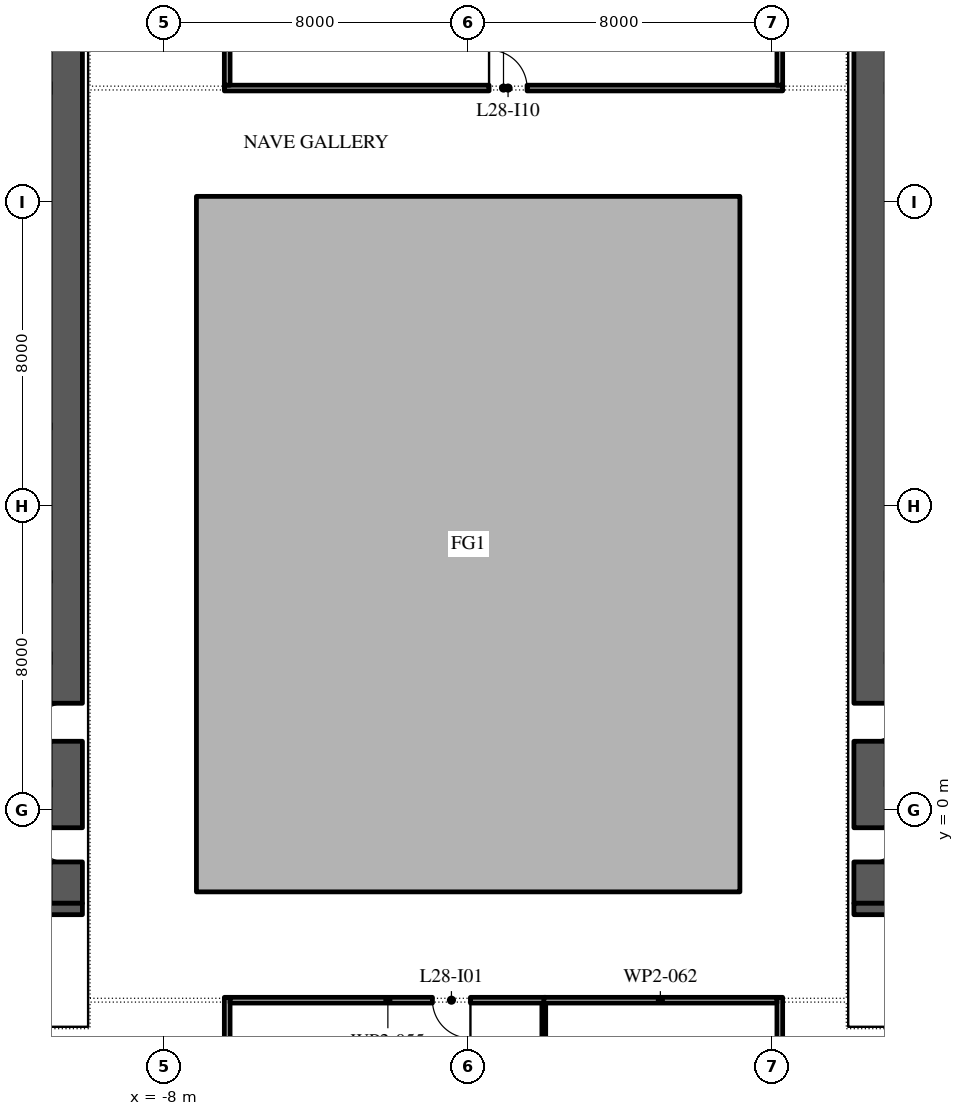
"""IFC4 building model, lengths in metres.
Left out: names, types, materials, properties, quantities, classifications, styles, units other than length and angle.
Written with IfcOpenShell. Run it as: python <this file> out.ifc"""

import sys

from ifc_helpers import new_model, si_unit, direction, frame, frame_2d, origin, place, context, subcontext, project, spatial, polyline, rectangle, outline, extrude, element, fill, save


model = new_model("IFC4")
c1 = context("Model", 3, precision=1e-05, world=origin(), true_north=direction((0.0, 1.0)))
c2 = subcontext(c1, "Body", "Model", "MODEL_VIEW")
j1 = project(units=[si_unit("LENGTHUNIT", "METRE"), si_unit("PLANEANGLEUNIT", "RADIAN")], contexts=[c1])
p1 = place(None, origin())
s1 = spatial("IfcSite", under=j1, at=p1, CompositionType="ELEMENT")
p2 = place(p1, origin())
s2 = spatial("IfcBuilding", under=s1, at=p2, CompositionType="ELEMENT")
p3 = place(p2, frame((0.0, 0.0, 130.8)))
s3 = spatial("IfcBuildingStorey", under=s2, at=p3, CompositionType="ELEMENT", Elevation=130.8)
p4 = place(p3, origin())
e1 = element("IfcWall", 1, at=p4, inside=s3, PredefinedType="STANDARD", context=c2, shape_type="SweptSolid", body=[
    extrude(outline(polyline([(-7.15, -2.15), (7.15, -2.15), (7.15, 16.15), (-7.15, 16.15), (-7.15, -2.15)]), holes=[polyline([(-7.0, -2.0), (-7.0, 16.0), (7.0, 16.0), (7.0, -2.0), (-7.0, -2.0)])]), origin(), (0.0, 0.0, 1.0), 4.0),
])
p5 = place(p3, frame((-10.575, -2.45, 0.0), z_axis=(0.0, 0.0, 1.0), x_axis=(0.0, 1.0, 0.0)))
e2 = element("IfcWall", 2, at=p5, inside=s3, PredefinedType="SHEAR", context=c2, shape_type="SweptSolid", body=[
    extrude(rectangle(XDim=27.9, YDim=0.85, at=frame_2d((13.95, 0.0))), origin(), (0.0, 0.0, 1.0), 4.0),
])
p6 = place(p5, frame((23.65, 0.0, 0.0)))
e3 = element("IfcOpeningElement", 3, at=p6, cuts=e2, PredefinedType="OPENING", context=c2, shape_type="SweptSolid", body=[
    extrude(rectangle(XDim=2.4, YDim=2.1, at=frame_2d((1.2, 1.05))), frame((0.0, 0.435, 0.0), z_axis=(0.0, -1.0, 0.0), x_axis=(1.0, 0.0, 0.0)), (0.0, 0.0, 1.0), 0.87),
])
p7 = place(p5, frame((1.087, 0.0, 0.0)))
e4 = element("IfcOpeningElement", 4, at=p7, cuts=e2, PredefinedType="OPENING", context=c2, shape_type="SweptSolid", body=[
    extrude(rectangle(XDim=0.9, YDim=2.1, at=frame_2d((0.45, 1.05))), frame((0.0, 0.435, 0.0), z_axis=(0.0, -1.0, 0.0), x_axis=(1.0, 0.0, 0.0)), (0.0, 0.0, 1.0), 0.87),
])
p8 = place(p5, frame((4.262, 0.0, 0.0)))
e5 = element("IfcOpeningElement", 5, at=p8, cuts=e2, PredefinedType="OPENING", context=c2, shape_type="SweptSolid", body=[
    extrude(rectangle(XDim=1.0, YDim=2.1, at=frame_2d((0.5, 1.05))), frame((0.0, 0.435, 0.0), z_axis=(0.0, -1.0, 0.0), x_axis=(1.0, 0.0, 0.0)), (0.0, 0.0, 1.0), 0.87),
])
p9 = place(p3, frame((-21.85, -2.6, 0.0), z_axis=(0.0, 0.0, 1.0), x_axis=(1.0, 0.0, 0.0)))
e6 = element("IfcWall", 6, at=p9, inside=s3, PredefinedType="SHEAR", context=c2, shape_type="SweptSolid", body=[
    extrude(rectangle(XDim=11.7, YDim=0.3, at=frame_2d((5.85, 0.0))), origin(), (0.0, 0.0, 1.0), 4.0),
])
p10 = place(p3, frame((10.575, -2.45, 0.0), z_axis=(0.0, 0.0, 1.0), x_axis=(0.0, 1.0, 0.0)))
e7 = element("IfcWall", 7, at=p10, inside=s3, PredefinedType="SHEAR", context=c2, shape_type="SweptSolid", body=[
    extrude(rectangle(XDim=27.9, YDim=0.85, at=frame_2d((13.95, 0.0))), origin(), (0.0, 0.0, 1.0), 4.0),
])
p11 = place(p10, frame((23.65, 0.0, 0.0)))
e8 = element("IfcOpeningElement", 8, at=p11, cuts=e7, PredefinedType="OPENING", context=c2, shape_type="SweptSolid", body=[
    extrude(rectangle(XDim=2.4, YDim=2.1, at=frame_2d((1.2, 1.05))), frame((0.0, 0.435, 0.0), z_axis=(0.0, -1.0, 0.0), x_axis=(1.0, 0.0, 0.0)), (0.0, 0.0, 1.0), 0.87),
])
p12 = place(p10, frame((1.087, 0.0, 0.0)))
e9 = element("IfcOpeningElement", 9, at=p12, cuts=e7, PredefinedType="OPENING", context=c2, shape_type="SweptSolid", body=[
    extrude(rectangle(XDim=0.9, YDim=2.1, at=frame_2d((0.45, 1.05))), frame((0.0, 0.435, 0.0), z_axis=(0.0, -1.0, 0.0), x_axis=(1.0, 0.0, 0.0)), (0.0, 0.0, 1.0), 0.87),
])
p13 = place(p10, frame((4.262, 0.0, 0.0)))
e10 = element("IfcOpeningElement", 10, at=p13, cuts=e7, PredefinedType="OPENING", context=c2, shape_type="SweptSolid", body=[
    extrude(rectangle(XDim=1.0, YDim=2.1, at=frame_2d((0.5, 1.05))), frame((0.0, 0.435, 0.0), z_axis=(0.0, -1.0, 0.0), x_axis=(1.0, 0.0, 0.0)), (0.0, 0.0, 1.0), 0.87),
])
p14 = place(p3, frame((10.15, -2.6, 0.0), z_axis=(0.0, 0.0, 1.0), x_axis=(1.0, 0.0, 0.0)))
e11 = element("IfcWall", 11, at=p14, inside=s3, PredefinedType="SHEAR", context=c2, shape_type="SweptSolid", body=[
    extrude(rectangle(XDim=11.7, YDim=0.3, at=frame_2d((5.85, 0.0))), origin(), (0.0, 0.0, 1.0), 4.0),
])
p15 = place(p3, frame((-6.34, -4.925, 0.0), z_axis=(0.0, 0.0, 1.0), x_axis=(0.0, -1.0, 0.0)))
e12 = element("IfcWall", 12, at=p15, inside=s3, PredefinedType="PARTITIONING", context=c2, shape_type="SweptSolid", body=[
    extrude(rectangle(XDim=2.565, YDim=0.15, at=frame_2d((1.282, 0.0))), origin(), (0.0, 0.0, 1.0), 4.0),
])
p16 = place(p3, frame((-6.415, 19.0, 0.0), z_axis=(0.0, 0.0, 1.0), x_axis=(1.0, 0.0, 0.0)))
e13 = element("IfcWall", 13, at=p16, inside=s3, PredefinedType="PARTITIONING", context=c2, shape_type="SweptSolid", body=[
    extrude(rectangle(XDim=14.69, YDim=0.15, at=frame_2d((7.345, 0.0))), origin(), (0.0, 0.0, 1.0), 4.0),
])
p17 = place(p16, frame((6.965, 0.0, 0.0)))
e14 = element("IfcOpeningElement", 14, at=p17, cuts=e13, PredefinedType="OPENING", context=c2, shape_type="SweptSolid", body=[
    extrude(rectangle(XDim=1.0, YDim=2.1, at=frame_2d((0.5, 1.05))), frame((0.0, 0.085, 0.0), z_axis=(0.0, -1.0, 0.0), x_axis=(1.0, 0.0, 0.0)), (0.0, 0.0, 1.0), 0.17),
])
p18 = place(p3, frame((-6.34, 23.46, 0.0), z_axis=(0.0, 0.0, 1.0), x_axis=(0.0, -1.0, 0.0)))
e15 = element("IfcWall", 15, at=p18, inside=s3, PredefinedType="PARTITIONING", context=c2, shape_type="SweptSolid", body=[
    extrude(rectangle(XDim=4.385, YDim=0.15, at=frame_2d((2.192, 0.0))), origin(), (0.0, 0.0, 1.0), 4.0),
])
p19 = place(p3, frame((2.04, -5.0, 0.0), z_axis=(0.0, 0.0, 1.0), x_axis=(-1.0, 0.0, 0.0)))
e16 = element("IfcWall", 16, at=p19, inside=s3, PredefinedType="PARTITIONING", context=c2, shape_type="SweptSolid", body=[
    extrude(rectangle(XDim=8.305, YDim=0.15, at=frame_2d((4.152, 0.0))), origin(), (0.0, 0.0, 1.0), 4.0),
])
p20 = place(p19, frame((1.98, 0.0, 0.0)))
e17 = element("IfcOpeningElement", 17, at=p20, cuts=e16, PredefinedType="OPENING", context=c2, shape_type="SweptSolid", body=[
    extrude(rectangle(XDim=1.0, YDim=2.1, at=frame_2d((0.5, 1.05))), frame((0.0, 0.085, 0.0), z_axis=(0.0, -1.0, 0.0), x_axis=(1.0, 0.0, 0.0)), (0.0, 0.0, 1.0), 0.17),
])
p21 = place(p3, frame((1.99, -5.075, 0.0), z_axis=(0.0, 0.0, 1.0), x_axis=(0.0, -1.0, 0.0)))
e18 = element("IfcWall", 18, at=p21, inside=s3, PredefinedType="PARTITIONING", context=c2, shape_type="SweptSolid", body=[
    extrude(rectangle(XDim=5.875, YDim=0.1, at=frame_2d((2.938, 0.0))), origin(), (0.0, 0.0, 1.0), 4.0),
])
p22 = place(p3, frame((8.2, -7.575, 0.0), z_axis=(0.0, 0.0, 1.0), x_axis=(0.0, 1.0, 0.0)))
e19 = element("IfcWall", 19, at=p22, inside=s3, PredefinedType="PARTITIONING", context=c2, shape_type="SweptSolid", body=[
    extrude(rectangle(XDim=2.65, YDim=0.15, at=frame_2d((1.325, 0.0))), origin(), (0.0, 0.0, 1.0), 4.0),
])
p23 = place(p3, frame((8.125, -5.0, 0.0), z_axis=(0.0, 0.0, 1.0), x_axis=(-1.0, 0.0, 0.0)))
e20 = element("IfcWall", 20, at=p23, inside=s3, PredefinedType="PARTITIONING", context=c2, shape_type="SweptSolid", body=[
    extrude(rectangle(XDim=6.135, YDim=0.15, at=frame_2d((3.067, 0.0))), origin(), (0.0, 0.0, 1.0), 4.0),
])
p24 = place(p3, frame((8.2, 19.075, 0.0), z_axis=(0.0, 0.0, 1.0), x_axis=(0.0, 1.0, 0.0)))
e21 = element("IfcWall", 21, at=p24, inside=s3, PredefinedType="PARTITIONING", context=c2, shape_type="SweptSolid", body=[
    extrude(rectangle(XDim=4.285, YDim=0.15, at=frame_2d((2.143, 0.0))), origin(), (0.0, 0.0, 1.0), 4.0),
])
p25 = place(p7, origin())
e22 = element("IfcDoor", 22, at=p25, inside=s3, OperationType="SINGLE_SWING_LEFT", PredefinedType="DOOR", context=c2, shape_type="SweptSolid", body=[
    extrude(rectangle(XDim=0.9, YDim=2.1, at=frame_2d((0.45, 1.05))), frame((0.0, 0.425, 0.0), z_axis=(0.0, -1.0, 0.0), x_axis=(1.0, 0.0, 0.0)), (0.0, 0.0, 1.0), 0.05),
])
fill(e4, e22)
p26 = place(p8, origin())
e23 = element("IfcDoor", 23, at=p26, inside=s3, OperationType="SINGLE_SWING_RIGHT", PredefinedType="DOOR", context=c2, shape_type="SweptSolid", body=[
    extrude(rectangle(XDim=1.0, YDim=2.1, at=frame_2d((0.5, 1.05))), frame((0.0, 0.425, 0.0), z_axis=(0.0, -1.0, 0.0), x_axis=(1.0, 0.0, 0.0)), (0.0, 0.0, 1.0), 0.05),
])
fill(e5, e23)
p27 = place(p12, frame((0.9, -0.8, 0.0), z_axis=(0.0, 0.0, 1.0), x_axis=(-1.0, 0.0, 0.0)))
e24 = element("IfcDoor", 24, at=p27, inside=s3, OperationType="SINGLE_SWING_RIGHT", PredefinedType="DOOR", context=c2, shape_type="SweptSolid", body=[
    extrude(rectangle(XDim=0.9, YDim=2.1, at=frame_2d((0.45, 1.05))), frame((0.0, -0.375, 0.0), z_axis=(0.0, -1.0, 0.0), x_axis=(1.0, 0.0, 0.0)), (0.0, 0.0, 1.0), 0.05),
])
fill(e9, e24)
p28 = place(p13, frame((1.0, -0.8, 0.0), z_axis=(0.0, 0.0, 1.0), x_axis=(-1.0, 0.0, 0.0)))
e25 = element("IfcDoor", 25, at=p28, inside=s3, OperationType="SINGLE_SWING_RIGHT", PredefinedType="DOOR", context=c2, shape_type="SweptSolid", body=[
    extrude(rectangle(XDim=1.0, YDim=2.1, at=frame_2d((0.5, 1.05))), frame((0.0, -0.375, 0.0), z_axis=(0.0, -1.0, 0.0), x_axis=(1.0, 0.0, 0.0)), (0.0, 0.0, 1.0), 0.05),
])
fill(e10, e25)
p29 = place(p20, origin())
e26 = element("IfcDoor", 26, at=p29, inside=s3, OperationType="SINGLE_SWING_RIGHT", PredefinedType="DOOR", context=c2, shape_type="SweptSolid", body=[
    extrude(rectangle(XDim=1.0, YDim=2.1, at=frame_2d((0.5, 1.05))), frame((0.0, 0.025, 0.0), z_axis=(0.0, -1.0, 0.0), x_axis=(1.0, 0.0, 0.0)), (0.0, 0.0, 1.0), 0.05),
])
fill(e17, e26)
p30 = place(p17, origin())
e27 = element("IfcDoor", 27, at=p30, inside=s3, OperationType="SINGLE_SWING_RIGHT", PredefinedType="DOOR", context=c2, shape_type="SweptSolid", body=[
    extrude(rectangle(XDim=1.0, YDim=2.1, at=frame_2d((0.5, 1.05))), frame((0.0, 0.025, 0.0), z_axis=(0.0, -1.0, 0.0), x_axis=(1.0, 0.0, 0.0)), (0.0, 0.0, 1.0), 0.05),
])
fill(e14, e27)
save(model, sys.argv[1])
